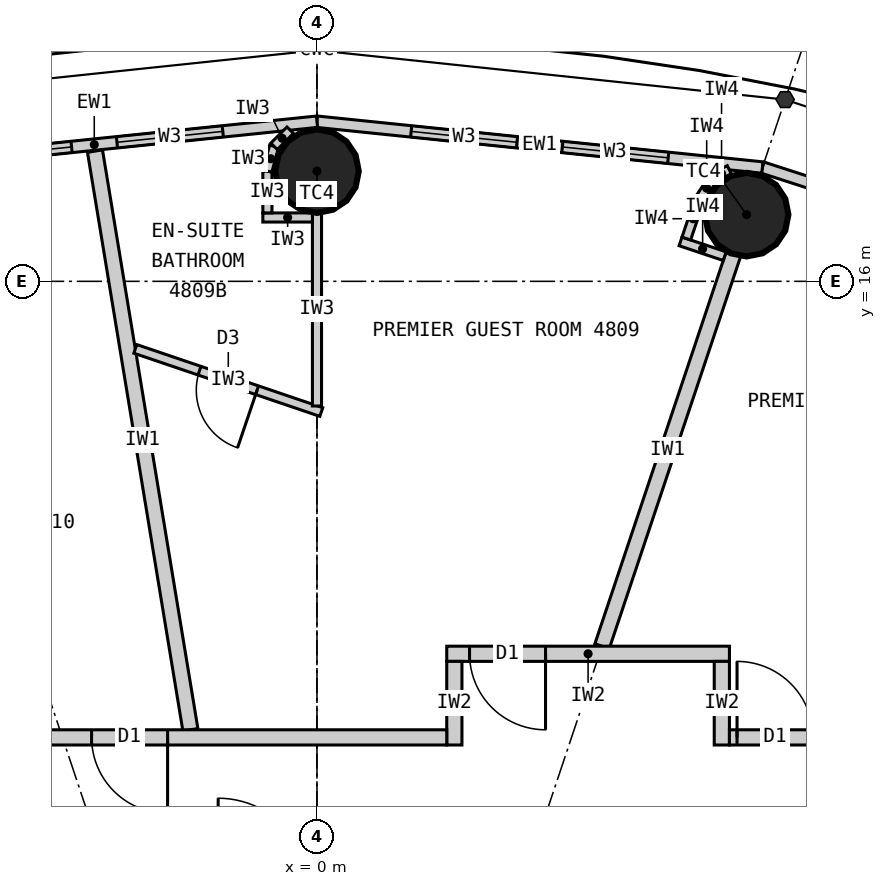
"""IFC4 building model, lengths in metres.
Left out: names, types, materials, properties, quantities, classifications, styles, units other than length and angle.
Written with IfcOpenShell. Run it as: python <this file> out.ifc"""

import sys

from ifc_helpers import new_model, si_unit, direction, frame, frame_2d, origin, origin_2d, place, context, subcontext, project, spatial, rectangle, circle, extrude, element, fill, save


model = new_model("IFC4")
c1 = context("Model", 3, precision=1e-05, world=origin(), true_north=direction((0.0, 1.0)))
c2 = subcontext(c1, "Body", "Model", "MODEL_VIEW")
j1 = project(units=[si_unit("LENGTHUNIT", "METRE"), si_unit("PLANEANGLEUNIT", "RADIAN")], contexts=[c1])
p1 = place(None, origin())
s1 = spatial("IfcSite", under=j1, at=p1, CompositionType="ELEMENT")
p2 = place(p1, origin())
s2 = spatial("IfcBuilding", under=s1, at=p2, CompositionType="ELEMENT")
p3 = place(p2, frame((0.0, 0.0, 179.7)))
s3 = spatial("IfcBuildingStorey", under=s2, at=p3, CompositionType="ELEMENT", Elevation=179.7)
for number, where, z_axis, x_axis in (
    (1, (5.653, 16.877, 0.0), (0.0, 0.0, 1.0), (1.0, 0.0, 0.0)),
    (2, (0.0, 17.45, 0.0), (0.0, 0.0, 1.0), (1.0, 0.0, 0.0)),
):
    element("IfcColumn", number, at=place(p3, frame(where, z_axis=z_axis, x_axis=x_axis)), inside=s3, PredefinedType="COLUMN", context=c2, shape_type="SweptSolid", body=[
        extrude(circle(Radius=0.55, at=origin_2d()), origin(), (0.0, 0.0, 1.0), 3.3),
    ])
p4 = place(p3, frame((11.346, 15.722, 0.0), z_axis=(0.0, 0.0, 1.0), x_axis=(-0.951432482129, 0.307857486429, 0.0)))
e3 = element("IfcWall", 3, at=p4, inside=s3, PredefinedType="ELEMENTEDWALL", context=c2, shape_type="SweptSolid", body=[
    extrude(rectangle(XDim=5.766, YDim=0.15, at=frame_2d((2.883, 0.0))), origin(), (0.0, 0.0, 1.0), 3.12),
])
p5 = place(p4, frame((1.183, 0.0, 0.9)))
e4 = element("IfcOpeningElement", 4, at=p5, cuts=e3, PredefinedType="OPENING", context=c2, shape_type="SweptSolid", body=[
    extrude(rectangle(XDim=1.4, YDim=1.9, at=frame_2d((0.7, 0.95))), frame((0.0, 0.085, 0.0), z_axis=(0.0, -1.0, 0.0), x_axis=(1.0, 0.0, 0.0)), (0.0, 0.0, 1.0), 0.17),
])
p6 = place(p4, frame((3.183, 0.0, 0.9)))
e5 = element("IfcOpeningElement", 5, at=p6, cuts=e3, PredefinedType="OPENING", context=c2, shape_type="SweptSolid", body=[
    extrude(rectangle(XDim=1.4, YDim=1.9, at=frame_2d((0.7, 0.95))), frame((0.0, 0.085, 0.0), z_axis=(0.0, -1.0, 0.0), x_axis=(1.0, 0.0, 0.0)), (0.0, 0.0, 1.0), 0.17),
])
p7 = place(p3, frame((5.86, 17.497, 0.0), z_axis=(0.0, 0.0, 1.0), x_axis=(-0.994751738032, 0.102318032045, 0.0)))
e6 = element("IfcWall", 6, at=p7, inside=s3, PredefinedType="ELEMENTEDWALL", context=c2, shape_type="SweptSolid", body=[
    extrude(rectangle(XDim=5.891, YDim=0.15, at=frame_2d((2.946, 0.0))), origin(), (0.0, 0.0, 1.0), 3.12),
])
p8 = place(p7, frame((1.246, 0.0, 0.9)))
e7 = element("IfcOpeningElement", 7, at=p8, cuts=e6, PredefinedType="OPENING", context=c2, shape_type="SweptSolid", body=[
    extrude(rectangle(XDim=1.4, YDim=1.9, at=frame_2d((0.7, 0.95))), frame((0.0, 0.085, 0.0), z_axis=(0.0, -1.0, 0.0), x_axis=(1.0, 0.0, 0.0)), (0.0, 0.0, 1.0), 0.17),
])
p9 = place(p7, frame((3.246, 0.0, 0.9)))
e8 = element("IfcOpeningElement", 8, at=p9, cuts=e6, PredefinedType="OPENING", context=c2, shape_type="SweptSolid", body=[
    extrude(rectangle(XDim=1.4, YDim=1.9, at=frame_2d((0.7, 0.95))), frame((0.0, 0.085, 0.0), z_axis=(0.0, -1.0, 0.0), x_axis=(1.0, 0.0, 0.0)), (0.0, 0.0, 1.0), 0.17),
])
p10 = place(p3, frame((0.0, 18.1, 0.0), z_axis=(0.0, 0.0, 1.0), x_axis=(-0.994751738032, -0.102318032045, 0.0)))
e9 = element("IfcWall", 9, at=p10, inside=s3, PredefinedType="ELEMENTEDWALL", context=c2, shape_type="SweptSolid", body=[
    extrude(rectangle(XDim=5.891, YDim=0.15, at=frame_2d((2.946, 0.0))), origin(), (0.0, 0.0, 1.0), 3.12),
])
p11 = place(p10, frame((1.246, 0.0, 0.9)))
e10 = element("IfcOpeningElement", 10, at=p11, cuts=e9, PredefinedType="OPENING", context=c2, shape_type="SweptSolid", body=[
    extrude(rectangle(XDim=1.4, YDim=1.9, at=frame_2d((0.7, 0.95))), frame((0.0, 0.085, 0.0), z_axis=(0.0, -1.0, 0.0), x_axis=(1.0, 0.0, 0.0)), (0.0, 0.0, 1.0), 0.17),
])
p12 = place(p10, frame((3.246, 0.0, 0.9)))
e11 = element("IfcOpeningElement", 11, at=p12, cuts=e9, PredefinedType="OPENING", context=c2, shape_type="SweptSolid", body=[
    extrude(rectangle(XDim=1.4, YDim=1.9, at=frame_2d((0.7, 0.95))), frame((0.0, 0.085, 0.0), z_axis=(0.0, -1.0, 0.0), x_axis=(1.0, 0.0, 0.0)), (0.0, 0.0, 1.0), 0.17),
])
p13 = place(p3, frame((3.751, 11.2, 0.0), z_axis=(0.0, 0.0, 1.0), x_axis=(0.317614803807, 0.948219824937, 0.0)))
e12 = element("IfcWall", 12, at=p13, inside=s3, PredefinedType="PARTITIONING", context=c2, shape_type="SweptSolid", body=[
    extrude(rectangle(XDim=5.438, YDim=0.2, at=frame_2d((2.719, 0.0))), origin(), (0.0, 0.0, 1.0), 2.27),
])
p14 = place(p3, frame((-1.666, 10.1, 0.0), z_axis=(0.0, 0.0, 1.0), x_axis=(-0.162669562982, 0.986680603478, 0.0)))
e13 = element("IfcWall", 13, at=p14, inside=s3, PredefinedType="PARTITIONING", context=c2, shape_type="SweptSolid", body=[
    extrude(rectangle(XDim=7.716, YDim=0.2, at=frame_2d((3.858, 0.0))), origin(), (0.0, 0.0, 1.0), 3.12),
])
p15 = place(p3, frame((1.708, 11.1, 0.0), z_axis=(0.0, 0.0, 1.0), x_axis=(1.0, 0.0, 0.0)))
e14 = element("IfcWall", 14, at=p15, inside=s3, PredefinedType="PARTITIONING", context=c2, shape_type="SweptSolid", body=[
    extrude(rectangle(XDim=3.719, YDim=0.2, at=frame_2d((1.86, 0.0))), origin(), (0.0, 0.0, 1.0), 3.12),
])
p16 = place(p15, frame((0.3, 0.0, 0.0)))
e15 = element("IfcOpeningElement", 15, at=p16, cuts=e14, PredefinedType="OPENING", context=c2, shape_type="SweptSolid", body=[
    extrude(rectangle(XDim=1.0, YDim=2.2, at=frame_2d((0.5, 1.1))), frame((0.0, 0.11, 0.0), z_axis=(0.0, -1.0, 0.0), x_axis=(1.0, 0.0, 0.0)), (0.0, 0.0, 1.0), 0.22),
])
for number, where, z_axis, x_axis in (
    (16, (1.807, 9.9, 0.0), (0.0, 0.0, 1.0), (0.0, 1.0, 0.0)),
    (17, (5.327, 9.9, 0.0), (0.0, 0.0, 1.0), (0.0, 1.0, 0.0)),
):
    element("IfcWall", number, at=place(p3, frame(where, z_axis=z_axis, x_axis=x_axis)), inside=s3, PredefinedType="PARTITIONING", context=c2, shape_type="SweptSolid", body=[
        extrude(rectangle(XDim=1.1, YDim=0.2, at=frame_2d((0.55, 0.0))), origin(), (0.0, 0.0, 1.0), 3.12),
    ])
p17 = place(p3, frame((-2.39, 15.111, 0.0), z_axis=(0.0, 0.0, 1.0), x_axis=(0.946949953534, -0.321381059649, 0.0)))
e18 = element("IfcWall", 18, at=p17, inside=s3, PredefinedType="PARTITIONING", context=c2, shape_type="SweptSolid", body=[
    extrude(rectangle(XDim=2.584, YDim=0.12, at=frame_2d((1.292, 0.0))), origin(), (0.0, 0.0, 1.0), 3.12),
])
p18 = place(p17, frame((0.892, 0.0, 0.0)))
e19 = element("IfcOpeningElement", 19, at=p18, cuts=e18, PredefinedType="OPENING", context=c2, shape_type="SweptSolid", body=[
    extrude(rectangle(XDim=0.8, YDim=2.1, at=frame_2d((0.4, 1.05))), frame((0.0, 0.07, 0.0), z_axis=(0.0, -1.0, 0.0), x_axis=(1.0, 0.0, 0.0)), (0.0, 0.0, 1.0), 0.14),
])
p19 = place(p3, frame((0.0, 14.36, 0.0), z_axis=(0.0, 0.0, 1.0), x_axis=(0.0, 1.0, 0.0)))
e20 = element("IfcWall", 20, at=p19, inside=s3, PredefinedType="PARTITIONING", context=c2, shape_type="SweptSolid", body=[
    extrude(rectangle(XDim=2.54, YDim=0.12, at=frame_2d((1.27, 0.0))), origin(), (0.0, 0.0, 1.0), 2.27),
])
p20 = place(p3, frame((-0.06, 16.84, 0.0), z_axis=(0.0, 0.0, 1.0), x_axis=(-1.0, 0.0, 0.0)))
e21 = element("IfcWall", 21, at=p20, inside=s3, PredefinedType="PARTITIONING", context=c2, shape_type="SweptSolid", body=[
    extrude(rectangle(XDim=0.652, YDim=0.12, at=frame_2d((0.326, 0.0))), origin(), (0.0, 0.0, 1.0), 3.12),
])
p21 = place(p3, frame((-0.652, 16.9, 0.0), z_axis=(0.0, 0.0, 1.0), x_axis=(0.0, 1.0, 0.0)))
e22 = element("IfcWall", 22, at=p21, inside=s3, PredefinedType="PARTITIONING", context=c2, shape_type="SweptSolid", body=[
    extrude(rectangle(XDim=0.55, YDim=0.12, at=frame_2d((0.275, 0.0))), origin(), (0.0, 0.0, 1.0), 3.12),
])
p22 = place(p3, frame((-0.652, 17.45, 0.0), z_axis=(0.0, 0.0, 1.0), x_axis=(0.258832454679, 0.965922233104, 0.0)))
e23 = element("IfcWall", 23, at=p22, inside=s3, PredefinedType="PARTITIONING", context=c2, shape_type="SweptSolid", body=[
    extrude(rectangle(XDim=0.338, YDim=0.12, at=frame_2d((0.169, 0.0))), origin(), (0.0, 0.0, 1.0), 3.12),
])
p23 = place(p3, frame((-0.565, 17.776, 0.0), z_axis=(0.0, 0.0, 1.0), x_axis=(0.707106781187, 0.707106781187, 0.0)))
e24 = element("IfcWall", 24, at=p23, inside=s3, PredefinedType="PARTITIONING", context=c2, shape_type="SweptSolid", body=[
    extrude(rectangle(XDim=0.301, YDim=0.12, at=frame_2d((0.15, 0.0))), origin(), (0.0, 0.0, 1.0), 3.12),
])
p24 = place(p3, frame((-14.1, 10.0, 0.0), z_axis=(0.0, 0.0, 1.0), x_axis=(1.0, 0.0, 0.0)))
e25 = element("IfcWall", 25, at=p24, inside=s3, PredefinedType="PARTITIONING", context=c2, shape_type="SweptSolid", body=[
    extrude(rectangle(XDim=15.808, YDim=0.2, at=frame_2d((7.904, 0.0))), origin(), (0.0, 0.0, 1.0), 3.12),
])
p25 = place(p24, frame((11.135, 0.0, 0.0)))
e26 = element("IfcOpeningElement", 26, at=p25, cuts=e25, PredefinedType="OPENING", context=c2, shape_type="SweptSolid", body=[
    extrude(rectangle(XDim=1.0, YDim=2.2, at=frame_2d((0.5, 1.1))), frame((0.0, 0.11, 0.0), z_axis=(0.0, -1.0, 0.0), x_axis=(1.0, 0.0, 0.0)), (0.0, 0.0, 1.0), 0.22),
])
p26 = place(p24, frame((1.895, 0.0, 0.0)))
e27 = element("IfcOpeningElement", 27, at=p26, cuts=e25, PredefinedType="OPENING", context=c2, shape_type="SweptSolid", body=[
    extrude(rectangle(XDim=1.0, YDim=2.2, at=frame_2d((0.5, 1.1))), frame((0.0, 0.11, 0.0), z_axis=(0.0, -1.0, 0.0), x_axis=(1.0, 0.0, 0.0)), (0.0, 0.0, 1.0), 0.22),
])
p27 = place(p3, frame((5.427, 10.0, 0.0), z_axis=(0.0, 0.0, 1.0), x_axis=(1.0, 0.0, 0.0)))
e28 = element("IfcWall", 28, at=p27, inside=s3, PredefinedType="PARTITIONING", context=c2, shape_type="SweptSolid", body=[
    extrude(rectangle(XDim=8.673, YDim=0.2, at=frame_2d((4.337, 0.0))), origin(), (0.0, 0.0, 1.0), 3.12),
])
p28 = place(p27, frame((0.1, 0.0, 0.0)))
e29 = element("IfcOpeningElement", 29, at=p28, cuts=e28, PredefinedType="OPENING", context=c2, shape_type="SweptSolid", body=[
    extrude(rectangle(XDim=1.0, YDim=2.2, at=frame_2d((0.5, 1.1))), frame((0.0, 0.11, 0.0), z_axis=(0.0, -1.0, 0.0), x_axis=(1.0, 0.0, 0.0)), (0.0, 0.0, 1.0), 0.22),
])
p29 = place(p3, frame((5.364, 16.331, 0.0), z_axis=(0.0, 0.0, 1.0), x_axis=(-0.948283770087, 0.317423835572, 0.0)))
e30 = element("IfcWall", 30, at=p29, inside=s3, PredefinedType="PARTITIONING", context=c2, shape_type="SweptSolid", body=[
    extrude(rectangle(XDim=0.612, YDim=0.12, at=frame_2d((0.306, 0.0))), origin(), (0.0, 0.0, 1.0), 3.12),
])
p30 = place(p3, frame((4.86, 16.563, 0.0), z_axis=(0.0, 0.0, 1.0), x_axis=(0.317825321803, 0.948149284038, 0.0)))
e31 = element("IfcWall", 31, at=p30, inside=s3, PredefinedType="PARTITIONING", context=c2, shape_type="SweptSolid", body=[
    extrude(rectangle(XDim=0.55, YDim=0.12, at=frame_2d((0.275, 0.0))), origin(), (0.0, 0.0, 1.0), 3.12),
])
p31 = place(p3, frame((5.034, 17.084, 0.0), z_axis=(0.0, 0.0, 1.0), x_axis=(0.552362205726, 0.833604218851, 0.0)))
e32 = element("IfcWall", 32, at=p31, inside=s3, PredefinedType="PARTITIONING", context=c2, shape_type="SweptSolid", body=[
    extrude(rectangle(XDim=0.338, YDim=0.12, at=frame_2d((0.169, 0.0))), origin(), (0.0, 0.0, 1.0), 3.12),
])
p32 = place(p3, frame((5.221, 17.366, 0.0), z_axis=(0.0, 0.0, 1.0), x_axis=(0.895067896179, 0.445929883759, 0.0)))
e33 = element("IfcWall", 33, at=p32, inside=s3, PredefinedType="PARTITIONING", context=c2, shape_type="SweptSolid", body=[
    extrude(rectangle(XDim=0.228, YDim=0.12, at=frame_2d((0.114, 0.0))), origin(), (0.0, 0.0, 1.0), 3.12),
])
p33 = place(p8, origin())
e34 = element("IfcWindow", 34, at=p33, inside=s3, PartitioningType="SINGLE_PANEL", PredefinedType="WINDOW", context=c2, shape_type="SweptSolid", body=[
    extrude(rectangle(XDim=1.4, YDim=1.9, at=frame_2d((0.7, 0.95))), frame((0.0, 0.03, 0.0), z_axis=(0.0, -1.0, 0.0), x_axis=(1.0, 0.0, 0.0)), (0.0, 0.0, 1.0), 0.06),
])
fill(e7, e34)
p34 = place(p9, origin())
e35 = element("IfcWindow", 35, at=p34, inside=s3, PartitioningType="SINGLE_PANEL", PredefinedType="WINDOW", context=c2, shape_type="SweptSolid", body=[
    extrude(rectangle(XDim=1.4, YDim=1.9, at=frame_2d((0.7, 0.95))), frame((0.0, 0.03, 0.0), z_axis=(0.0, -1.0, 0.0), x_axis=(1.0, 0.0, 0.0)), (0.0, 0.0, 1.0), 0.06),
])
fill(e8, e35)
p35 = place(p11, origin())
e36 = element("IfcWindow", 36, at=p35, inside=s3, PartitioningType="SINGLE_PANEL", PredefinedType="WINDOW", context=c2, shape_type="SweptSolid", body=[
    extrude(rectangle(XDim=1.4, YDim=1.9, at=frame_2d((0.7, 0.95))), frame((0.0, 0.03, 0.0), z_axis=(0.0, -1.0, 0.0), x_axis=(1.0, 0.0, 0.0)), (0.0, 0.0, 1.0), 0.06),
])
fill(e10, e36)
p36 = place(p12, origin())
e37 = element("IfcWindow", 37, at=p36, inside=s3, PartitioningType="SINGLE_PANEL", PredefinedType="WINDOW", context=c2, shape_type="SweptSolid", body=[
    extrude(rectangle(XDim=1.4, YDim=1.9, at=frame_2d((0.7, 0.95))), frame((0.0, 0.03, 0.0), z_axis=(0.0, -1.0, 0.0), x_axis=(1.0, 0.0, 0.0)), (0.0, 0.0, 1.0), 0.06),
])
fill(e11, e37)
p37 = place(p28, origin())
e38 = element("IfcDoor", 38, at=p37, inside=s3, OperationType="SINGLE_SWING_LEFT", PredefinedType="DOOR", context=c2, shape_type="SweptSolid", body=[
    extrude(rectangle(XDim=1.0, YDim=2.2, at=frame_2d((0.5, 1.1))), frame((0.0, 0.025, 0.0), z_axis=(0.0, -1.0, 0.0), x_axis=(1.0, 0.0, 0.0)), (0.0, 0.0, 1.0), 0.05),
])
fill(e29, e38)
p38 = place(p18, origin())
e39 = element("IfcDoor", 39, at=p38, inside=s3, OperationType="SINGLE_SWING_RIGHT", PredefinedType="DOOR", context=c2, shape_type="SweptSolid", body=[
    extrude(rectangle(XDim=0.8, YDim=2.1, at=frame_2d((0.4, 1.05))), frame((0.0, 0.025, 0.0), z_axis=(0.0, -1.0, 0.0), x_axis=(1.0, 0.0, 0.0)), (0.0, 0.0, 1.0), 0.05),
])
fill(e19, e39)
p39 = place(p16, origin())
e40 = element("IfcDoor", 40, at=p39, inside=s3, OperationType="SINGLE_SWING_RIGHT", PredefinedType="DOOR", context=c2, shape_type="SweptSolid", body=[
    extrude(rectangle(XDim=1.0, YDim=2.2, at=frame_2d((0.5, 1.1))), frame((0.0, 0.025, 0.0), z_axis=(0.0, -1.0, 0.0), x_axis=(1.0, 0.0, 0.0)), (0.0, 0.0, 1.0), 0.05),
])
fill(e15, e40)
p40 = place(p25, origin())
e41 = element("IfcDoor", 41, at=p40, inside=s3, OperationType="SINGLE_SWING_RIGHT", PredefinedType="DOOR", context=c2, shape_type="SweptSolid", body=[
    extrude(rectangle(XDim=1.0, YDim=2.2, at=frame_2d((0.5, 1.1))), frame((0.0, 0.025, 0.0), z_axis=(0.0, -1.0, 0.0), x_axis=(1.0, 0.0, 0.0)), (0.0, 0.0, 1.0), 0.05),
])
fill(e26, e41)
save(model, sys.argv[1])
